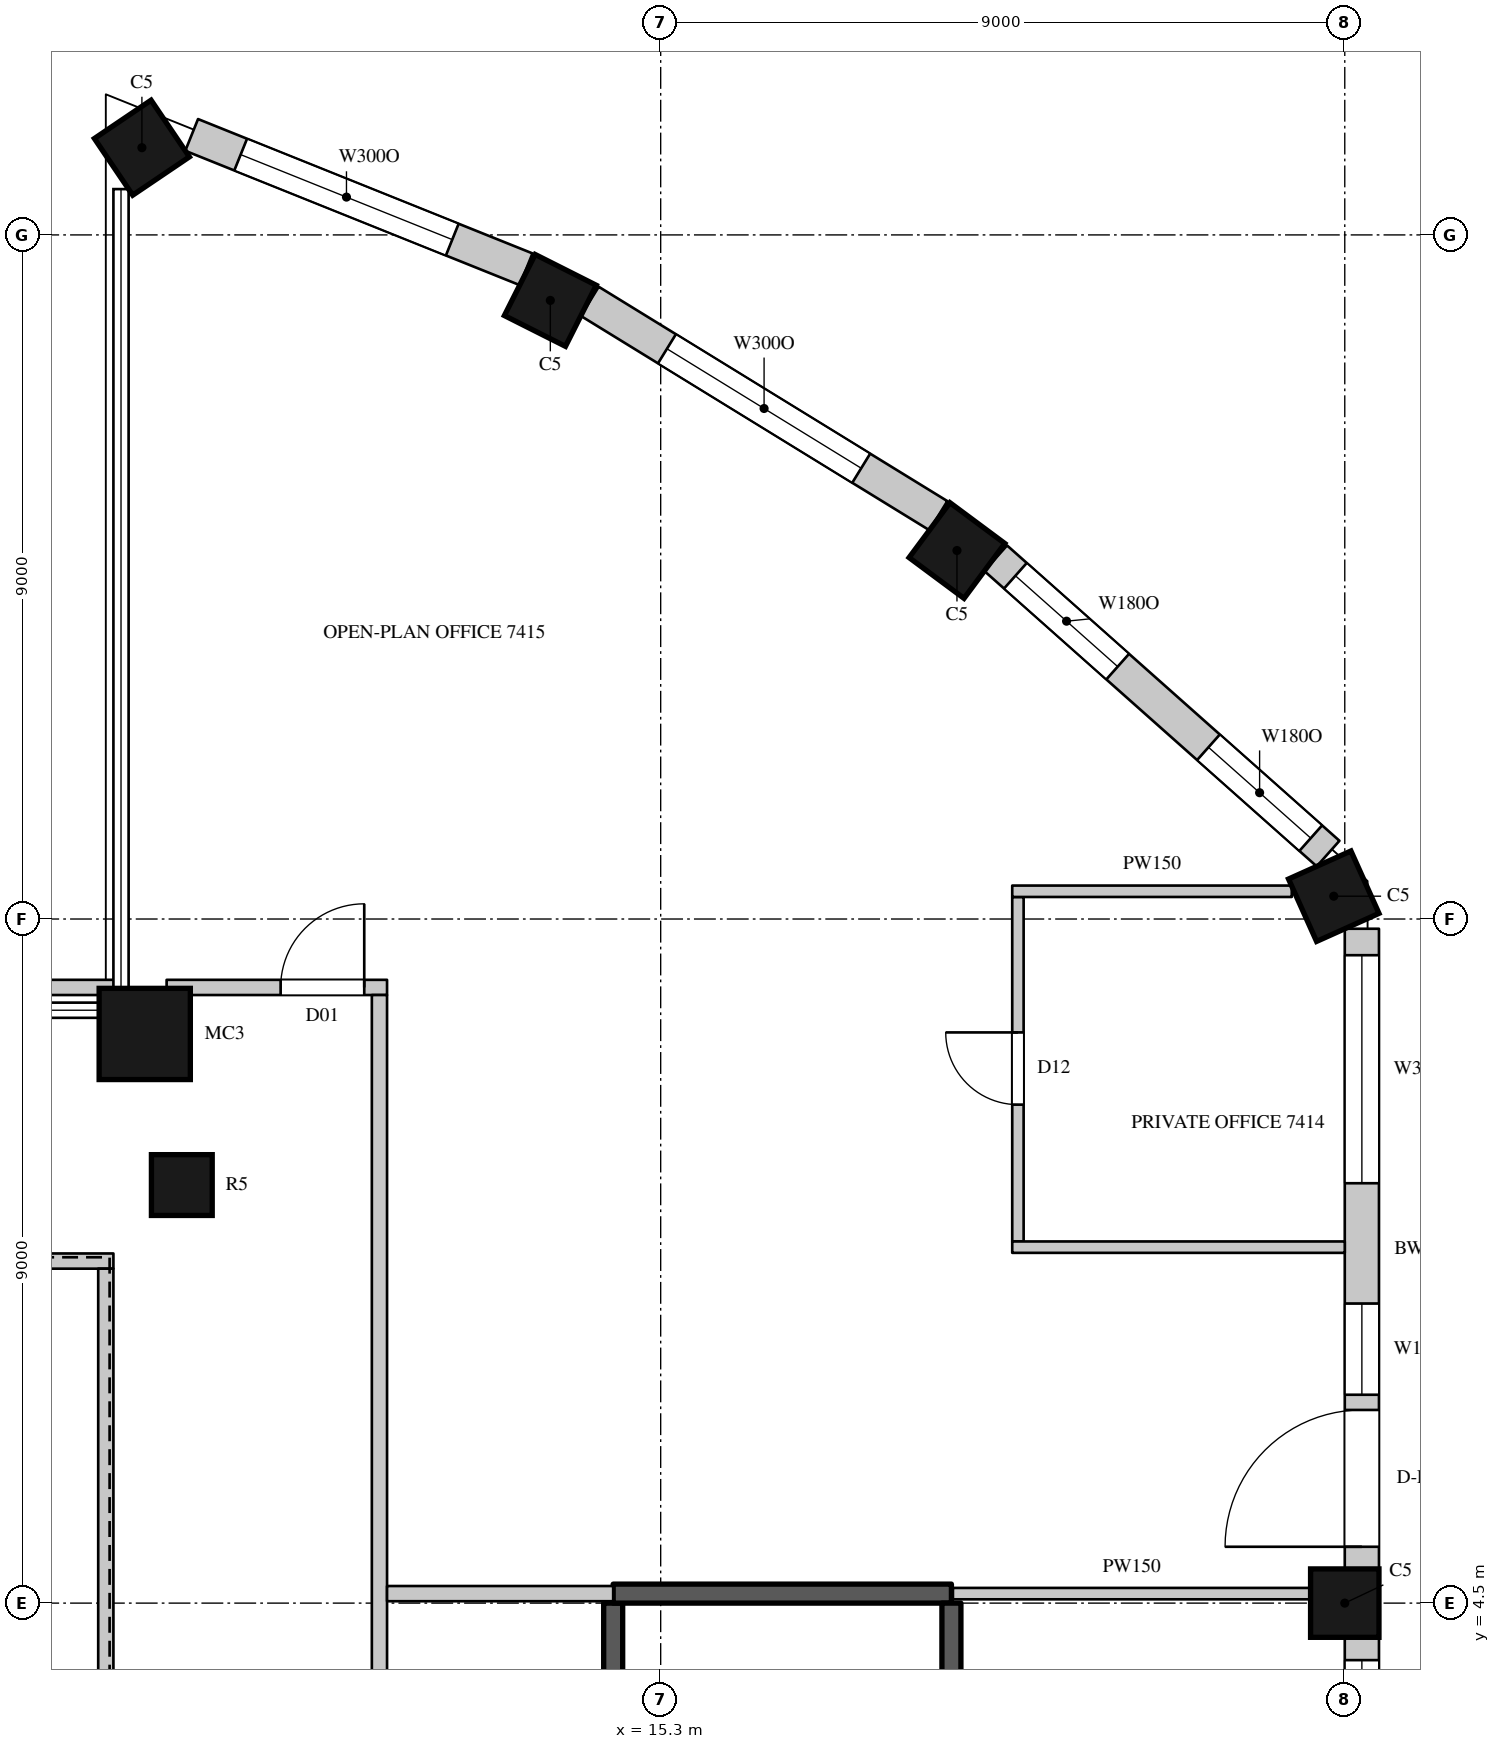
"""IFC4 building model, lengths in metres.
Left out: names, types, materials, properties, quantities, classifications, styles, units other than length and angle.
Written with IfcOpenShell. Run it as: python <this file> out.ifc"""

import sys

from ifc_helpers import new_model, si_unit, direction, frame, frame_2d, origin, origin_2d, place, context, subcontext, project, spatial, rectangle, circle, extrude, element, fill, save


model = new_model("IFC4")
c1 = context("Model", 3, precision=1e-05, world=origin(), true_north=direction((0.0, 1.0)))
c2 = subcontext(c1, "Body", "Model", "MODEL_VIEW")
j1 = project(units=[si_unit("LENGTHUNIT", "METRE"), si_unit("PLANEANGLEUNIT", "RADIAN")], contexts=[c1])
p1 = place(None, origin())
s1 = spatial("IfcSite", under=j1, at=p1, CompositionType="ELEMENT")
p2 = place(p1, origin())
s2 = spatial("IfcBuilding", under=s1, at=p2, CompositionType="ELEMENT")
p3 = place(p2, frame((0.0, 0.0, 325.4)))
s3 = spatial("IfcBuildingStorey", under=s2, at=p3, CompositionType="ELEMENT", Elevation=325.4)
p4 = place(p3, frame((8.475, 23.647, 0.0), z_axis=(0.0, 0.0, 1.0), x_axis=(-0.828469606019, -0.560034027451, 0.0)))
e1 = element("IfcColumn", 1, at=p4, inside=s3, PredefinedType="COLUMN", context=c2, shape_type="SweptSolid", body=[
    extrude(rectangle(XDim=0.9, YDim=0.9, at=origin_2d()), origin(), (0.0, 0.0, 1.0), 4.1),
])
p5 = place(p3, frame((8.512, 11.988, 0.0), z_axis=(0.0, 0.0, 1.0), x_axis=(1.0, 0.0, 0.0)))
e2 = element("IfcColumn", 2, at=p5, inside=s3, PredefinedType="COLUMN", context=c2, shape_type="SweptSolid", body=[
    extrude(circle(Radius=0.6, at=origin_2d()), origin(), (0.0, 0.0, 1.0), 4.1),
])
for number, where, z_axis, x_axis in (
    (3, (24.3, 4.5, 0.0), (0.0, 0.0, 1.0), (0.0, 1.0, 0.0)),
    (4, (24.155, 13.8, 0.0), (0.0, 0.0, 1.0), (-0.41, 0.912, 0.0)),
    (5, (19.198, 18.348, 0.0), (0.0, 0.0, 1.0), (-0.803, 0.596, 0.0)),
    (6, (13.848, 21.638, 0.0), (0.0, 0.0, 1.0), (-0.893, 0.45, 0.0)),
):
    element("IfcColumn", number, at=place(p3, frame(where, z_axis=z_axis, x_axis=x_axis)), inside=s3, PredefinedType="COLUMN", context=c2, shape_type="SweptSolid", body=[
        extrude(rectangle(XDim=0.9, YDim=0.9, at=origin_2d()), origin(), (0.0, 0.0, 1.0), 4.1),
    ])
p6 = place(p3, frame((9.0, 10.0, 0.0), z_axis=(0.0, 0.0, 1.0), x_axis=(1.0, 0.0, 0.0)))
e7 = element("IfcColumn", 7, at=p6, inside=s3, PredefinedType="COLUMN", context=c2, shape_type="SweptSolid", body=[
    extrude(circle(Radius=0.4, at=origin_2d()), origin(), (0.0, 0.0, 1.0), 4.1),
])
p7 = place(p3, frame((24.525, -4.05, 0.0), z_axis=(0.0, 0.0, 1.0), x_axis=(0.0, 1.0, 0.0)))
e8 = element("IfcWall", 8, at=p7, inside=s3, PredefinedType="SOLIDWALL", context=c2, shape_type="SweptSolid", body=[
    extrude(rectangle(XDim=8.1, YDim=0.45, at=frame_2d((4.05, 0.0))), origin(), (0.0, 0.0, 1.0), 3.8),
])
p8 = place(p7, frame((0.3, 0.0, 1.05)))
e9 = element("IfcOpeningElement", 9, at=p8, cuts=e8, PredefinedType="OPENING", context=c2, shape_type="SweptSolid", body=[
    extrude(rectangle(XDim=3.0, YDim=2.4, at=frame_2d((1.5, 1.2))), frame((0.0, 0.235, 0.0), z_axis=(0.0, -1.0, 0.0), x_axis=(1.0, 0.0, 0.0)), (0.0, 0.0, 1.0), 0.47),
])
p9 = place(p7, frame((4.8, 0.0, 1.05)))
e10 = element("IfcOpeningElement", 10, at=p9, cuts=e8, PredefinedType="OPENING", context=c2, shape_type="SweptSolid", body=[
    extrude(rectangle(XDim=3.0, YDim=2.4, at=frame_2d((1.5, 1.2))), frame((0.0, 0.235, 0.0), z_axis=(0.0, -1.0, 0.0), x_axis=(1.0, 0.0, 0.0)), (0.0, 0.0, 1.0), 0.47),
])
p10 = place(p3, frame((24.525, 4.95, 0.0), z_axis=(0.0, 0.0, 1.0), x_axis=(0.0, 1.0, 0.0)))
e11 = element("IfcWall", 11, at=p10, inside=s3, PredefinedType="SOLIDWALL", context=c2, shape_type="SweptSolid", body=[
    extrude(rectangle(XDim=8.422, YDim=0.45, at=frame_2d((4.211, 0.0))), origin(), (0.0, 0.0, 1.0), 3.8),
])
p11 = place(p10, frame((0.291, 0.0, 0.0)))
e12 = element("IfcOpeningElement", 12, at=p11, cuts=e11, PredefinedType="OPENING", context=c2, shape_type="SweptSolid", body=[
    extrude(rectangle(XDim=1.8, YDim=2.4, at=frame_2d((0.9, 1.2))), frame((0.0, 0.235, 0.0), z_axis=(0.0, -1.0, 0.0), x_axis=(1.0, 0.0, 0.0)), (0.0, 0.0, 1.0), 0.47),
])
p12 = place(p10, frame((2.291, 0.0, 1.05)))
e13 = element("IfcOpeningElement", 13, at=p12, cuts=e11, PredefinedType="OPENING", context=c2, shape_type="SweptSolid", body=[
    extrude(rectangle(XDim=1.2, YDim=2.4, at=frame_2d((0.6, 1.2))), frame((0.0, 0.235, 0.0), z_axis=(0.0, -1.0, 0.0), x_axis=(1.0, 0.0, 0.0)), (0.0, 0.0, 1.0), 0.47),
])
p13 = place(p10, frame((5.074, 0.0, 1.05)))
e14 = element("IfcOpeningElement", 14, at=p13, cuts=e11, PredefinedType="OPENING", context=c2, shape_type="SweptSolid", body=[
    extrude(rectangle(XDim=3.0, YDim=2.4, at=frame_2d((1.5, 1.2))), frame((0.0, 0.235, 0.0), z_axis=(0.0, -1.0, 0.0), x_axis=(1.0, 0.0, 0.0)), (0.0, 0.0, 1.0), 0.47),
])
p14 = place(p3, frame((24.081, 14.361, 0.0), z_axis=(0.0, 0.0, 1.0), x_axis=(-0.747570482973, 0.664182484704, 0.0)))
e15 = element("IfcWall", 15, at=p14, inside=s3, PredefinedType="SOLIDWALL", context=c2, shape_type="SweptSolid", body=[
    extrude(rectangle(XDim=5.85, YDim=0.45, at=frame_2d((2.925, 0.0))), origin(), (0.0, 0.0, 1.0), 3.8),
])
p15 = place(p14, frame((0.305, 0.0, 1.05)))
e16 = element("IfcOpeningElement", 16, at=p15, cuts=e15, PredefinedType="OPENING", context=c2, shape_type="SweptSolid", body=[
    extrude(rectangle(XDim=1.8, YDim=2.4, at=frame_2d((0.9, 1.2))), frame((0.0, 0.235, 0.0), z_axis=(0.0, -1.0, 0.0), x_axis=(1.0, 0.0, 0.0)), (0.0, 0.0, 1.0), 0.47),
])
p16 = place(p14, frame((3.703, 0.0, 1.05)))
e17 = element("IfcOpeningElement", 17, at=p16, cuts=e15, PredefinedType="OPENING", context=c2, shape_type="SweptSolid", body=[
    extrude(rectangle(XDim=1.8, YDim=2.4, at=frame_2d((0.9, 1.2))), frame((0.0, 0.235, 0.0), z_axis=(0.0, -1.0, 0.0), x_axis=(1.0, 0.0, 0.0)), (0.0, 0.0, 1.0), 0.47),
])
p17 = place(p3, frame((18.953, 18.806, 0.0), z_axis=(0.0, 0.0, 1.0), x_axis=(-0.851860664503, 0.523768468193, 0.0)))
e18 = element("IfcWall", 18, at=p17, inside=s3, PredefinedType="SOLIDWALL", context=c2, shape_type="SweptSolid", body=[
    extrude(rectangle(XDim=5.384, YDim=0.45, at=frame_2d((2.692, 0.0))), origin(), (0.0, 0.0, 1.0), 3.8),
])
p18 = place(p17, frame((1.192, 0.0, 1.05)))
e19 = element("IfcOpeningElement", 19, at=p18, cuts=e18, PredefinedType="OPENING", context=c2, shape_type="SweptSolid", body=[
    extrude(rectangle(XDim=3.0, YDim=2.4, at=frame_2d((1.5, 1.2))), frame((0.0, 0.235, 0.0), z_axis=(0.0, -1.0, 0.0), x_axis=(1.0, 0.0, 0.0)), (0.0, 0.0, 1.0), 0.47),
])
p19 = place(p3, frame((13.529, 22.048, 0.0), z_axis=(0.0, 0.0, 1.0), x_axis=(-0.927957332619, 0.372686448424, 0.0)))
e20 = element("IfcWall", 20, at=p19, inside=s3, PredefinedType="SOLIDWALL", context=c2, shape_type="SweptSolid", body=[
    extrude(rectangle(XDim=4.741, YDim=0.45, at=frame_2d((2.371, 0.0))), origin(), (0.0, 0.0, 1.0), 3.8),
])
p20 = place(p19, frame((1.047, 0.0, 1.05)))
e21 = element("IfcOpeningElement", 21, at=p20, cuts=e20, PredefinedType="OPENING", context=c2, shape_type="SweptSolid", body=[
    extrude(rectangle(XDim=3.0, YDim=2.4, at=frame_2d((1.5, 1.2))), frame((0.0, 0.235, 0.0), z_axis=(0.0, -1.0, 0.0), x_axis=(1.0, 0.0, 0.0)), (0.0, 0.0, 1.0), 0.47),
])
p21 = place(p3, frame((6.75, 12.6, 0.0), z_axis=(0.0, 0.0, 1.0), x_axis=(1.0, 0.0, 0.0)))
e22 = element("IfcWall", 22, at=p21, inside=s3, PredefinedType="PARTITIONING", context=c2, shape_type="SweptSolid", body=[
    extrude(rectangle(XDim=1.48, YDim=0.2, at=frame_2d((0.74, 0.0))), origin(), (0.0, 0.0, 1.0), 3.8),
])
p22 = place(p3, frame((-6.1, 9.0, 0.0), z_axis=(0.0, 0.0, 1.0), x_axis=(1.0, 0.0, 0.0)))
e23 = element("IfcWall", 23, at=p22, inside=s3, PredefinedType="PARTITIONING", context=c2, shape_type="SweptSolid", body=[
    extrude(rectangle(XDim=14.2, YDim=0.2, at=frame_2d((7.1, 0.0))), origin(), (0.0, 0.0, 1.0), 3.8),
])
p23 = place(p3, frame((8.0, 0.02, 0.0), z_axis=(0.0, 0.0, 1.0), x_axis=(0.0, 1.0, 0.0)))
e24 = element("IfcWall", 24, at=p23, inside=s3, PredefinedType="PARTITIONING", context=c2, shape_type="SweptSolid", body=[
    extrude(rectangle(XDim=8.88, YDim=0.2, at=frame_2d((4.44, 0.0))), origin(), (0.0, 0.0, 1.0), 3.8),
])
p24 = place(p3, frame((8.8, 12.6, 0.0), z_axis=(0.0, 0.0, 1.0), x_axis=(1.0, 0.0, 0.0)))
e25 = element("IfcWall", 25, at=p24, inside=s3, PredefinedType="PARTITIONING", context=c2, shape_type="SweptSolid", body=[
    extrude(rectangle(XDim=2.9, YDim=0.2, at=frame_2d((1.45, 0.0))), origin(), (0.0, 0.0, 1.0), 3.8),
])
p25 = place(p24, frame((1.5, 0.0, 0.0)))
e26 = element("IfcOpeningElement", 26, at=p25, cuts=e25, PredefinedType="OPENING", context=c2, shape_type="SweptSolid", body=[
    extrude(rectangle(XDim=1.1, YDim=2.4, at=frame_2d((0.55, 1.2))), frame((0.0, 0.11, 0.0), z_axis=(0.0, -1.0, 0.0), x_axis=(1.0, 0.0, 0.0)), (0.0, 0.0, 1.0), 0.22),
])
p26 = place(p3, frame((11.6, -12.5, 0.0), z_axis=(0.0, 0.0, 1.0), x_axis=(0.0, 1.0, 0.0)))
e27 = element("IfcWall", 27, at=p26, inside=s3, PredefinedType="PARTITIONING", context=c2, shape_type="SweptSolid", body=[
    extrude(rectangle(XDim=25.0, YDim=0.2, at=frame_2d((12.5, 0.0))), origin(), (0.0, 0.0, 1.0), 3.8),
])
p27 = place(p26, frame((9.4, 0.0, 0.0)))
e28 = element("IfcOpeningElement", 28, at=p27, cuts=e27, PredefinedType="OPENING", context=c2, shape_type="SweptSolid", body=[
    extrude(rectangle(XDim=1.5, YDim=2.4, at=frame_2d((0.75, 1.2))), frame((0.0, 0.11, 0.0), z_axis=(0.0, -1.0, 0.0), x_axis=(1.0, 0.0, 0.0)), (0.0, 0.0, 1.0), 0.22),
])
p28 = place(p26, frame((5.5, 0.0, 0.0)))
e29 = element("IfcOpeningElement", 29, at=p28, cuts=e27, PredefinedType="OPENING", context=c2, shape_type="SweptSolid", body=[
    extrude(rectangle(XDim=1.1, YDim=2.4, at=frame_2d((0.55, 1.2))), frame((0.0, 0.11, 0.0), z_axis=(0.0, -1.0, 0.0), x_axis=(1.0, 0.0, 0.0)), (0.0, 0.0, 1.0), 0.22),
])
p29 = place(p3, frame((11.7, 4.625, 0.0), z_axis=(0.0, 0.0, 1.0), x_axis=(1.0, 0.0, 0.0)))
e30 = element("IfcWall", 30, at=p29, inside=s3, PredefinedType="PARTITIONING", context=c2, shape_type="SweptSolid", body=[
    extrude(rectangle(XDim=2.975, YDim=0.2, at=frame_2d((1.488, 0.0))), origin(), (0.0, 0.0, 1.0), 3.8),
])
p30 = place(p3, frame((19.145, 4.625, 0.0), z_axis=(0.0, 0.0, 1.0), x_axis=(1.0, 0.0, 0.0)))
e31 = element("IfcWall", 31, at=p30, inside=s3, PredefinedType="PARTITIONING", context=c2, shape_type="SweptSolid", body=[
    extrude(rectangle(XDim=4.705, YDim=0.15, at=frame_2d((2.353, 0.0))), origin(), (0.0, 0.0, 1.0), 3.8),
])
p31 = place(p3, frame((20.0, 9.258, 0.0), z_axis=(0.0, 0.0, 1.0), x_axis=(0.0, 1.0, 0.0)))
e32 = element("IfcWall", 32, at=p31, inside=s3, PredefinedType="PARTITIONING", context=c2, shape_type="SweptSolid", body=[
    extrude(rectangle(XDim=4.532, YDim=0.15, at=frame_2d((2.266, 0.0))), origin(), (0.0, 0.0, 1.0), 3.8),
])
p32 = place(p31, frame((1.8, 0.0, 0.0)))
e33 = element("IfcOpeningElement", 33, at=p32, cuts=e32, PredefinedType="OPENING", context=c2, shape_type="SweptSolid", body=[
    extrude(rectangle(XDim=0.95, YDim=2.2, at=frame_2d((0.475, 1.1))), frame((0.0, 0.085, 0.0), z_axis=(0.0, -1.0, 0.0), x_axis=(1.0, 0.0, 0.0)), (0.0, 0.0, 1.0), 0.17),
])
p33 = place(p3, frame((19.925, 9.183, 0.0), z_axis=(0.0, 0.0, 1.0), x_axis=(1.0, 0.0, 0.0)))
e34 = element("IfcWall", 34, at=p33, inside=s3, PredefinedType="PARTITIONING", context=c2, shape_type="SweptSolid", body=[
    extrude(rectangle(XDim=4.375, YDim=0.15, at=frame_2d((2.188, 0.0))), origin(), (0.0, 0.0, 1.0), 3.8),
])
p34 = place(p3, frame((19.925, 13.865, 0.0), z_axis=(0.0, 0.0, 1.0), x_axis=(1.0, 0.0, 0.0)))
e35 = element("IfcWall", 35, at=p34, inside=s3, PredefinedType="PARTITIONING", context=c2, shape_type="SweptSolid", body=[
    extrude(rectangle(XDim=3.678, YDim=0.15, at=frame_2d((1.839, 0.0))), origin(), (0.0, 0.0, 1.0), 3.8),
])
p35 = place(p3, frame((14.675, -4.5, 0.0), z_axis=(0.0, 0.0, 1.0), x_axis=(0.0, 1.0, 0.0)))
e36 = element("IfcWall", 36, at=p35, inside=s3, PredefinedType="SHEAR", context=c2, shape_type="SweptSolid", body=[
    extrude(rectangle(XDim=9.0, YDim=0.25, at=frame_2d((4.5, 0.0))), origin(), (0.0, 0.0, 1.0), 3.8),
])
p36 = place(p35, frame((0.45, 0.0, 0.0)))
e37 = element("IfcOpeningElement", 37, at=p36, cuts=e36, PredefinedType="OPENING", context=c2, shape_type="SweptSolid", body=[
    extrude(rectangle(XDim=1.1, YDim=2.2, at=frame_2d((0.55, 1.1))), frame((0.0, 0.135, 0.0), z_axis=(0.0, -1.0, 0.0), x_axis=(1.0, 0.0, 0.0)), (0.0, 0.0, 1.0), 0.27),
])
p37 = place(p3, frame((14.675, 4.625, 0.0), z_axis=(0.0, 0.0, 1.0), x_axis=(1.0, 0.0, 0.0)))
e38 = element("IfcWall", 38, at=p37, inside=s3, PredefinedType="SHEAR", context=c2, shape_type="SweptSolid", body=[
    extrude(rectangle(XDim=4.45, YDim=0.25, at=frame_2d((2.225, 0.0))), origin(), (0.0, 0.0, 1.0), 3.8),
])
p38 = place(p3, frame((19.125, -4.5, 0.0), z_axis=(0.0, 0.0, 1.0), x_axis=(0.0, 1.0, 0.0)))
e39 = element("IfcWall", 39, at=p38, inside=s3, PredefinedType="SHEAR", context=c2, shape_type="SweptSolid", body=[
    extrude(rectangle(XDim=9.0, YDim=0.25, at=frame_2d((4.5, 0.0))), origin(), (0.0, 0.0, 1.0), 3.8),
])
p39 = place(p9, origin())
e40 = element("IfcWindow", 40, at=p39, inside=s3, PartitioningType="SINGLE_PANEL", PredefinedType="WINDOW", context=c2, shape_type="SweptSolid", body=[
    extrude(rectangle(XDim=3.0, YDim=2.4, at=frame_2d((1.5, 1.2))), frame((0.0, 0.135, 0.0), z_axis=(0.0, -1.0, 0.0), x_axis=(1.0, 0.0, 0.0)), (0.0, 0.0, 1.0), 0.06),
])
fill(e10, e40)
p40 = place(p11, origin())
e41 = element("IfcDoor", 41, at=p40, inside=s3, OperationType="SLIDING_TO_LEFT", PredefinedType="DOOR", context=c2, shape_type="SweptSolid", body=[
    extrude(rectangle(XDim=1.8, YDim=2.4, at=frame_2d((0.9, 1.2))), frame((0.0, 0.13, 0.0), z_axis=(0.0, -1.0, 0.0), x_axis=(1.0, 0.0, 0.0)), (0.0, 0.0, 1.0), 0.05),
])
fill(e12, e41)
p41 = place(p12, origin())
e42 = element("IfcWindow", 42, at=p41, inside=s3, PartitioningType="SINGLE_PANEL", PredefinedType="WINDOW", context=c2, shape_type="SweptSolid", body=[
    extrude(rectangle(XDim=1.2, YDim=2.4, at=frame_2d((0.6, 1.2))), frame((0.0, 0.135, 0.0), z_axis=(0.0, -1.0, 0.0), x_axis=(1.0, 0.0, 0.0)), (0.0, 0.0, 1.0), 0.06),
])
fill(e13, e42)
p42 = place(p13, origin())
e43 = element("IfcWindow", 43, at=p42, inside=s3, PartitioningType="SINGLE_PANEL", PredefinedType="WINDOW", context=c2, shape_type="SweptSolid", body=[
    extrude(rectangle(XDim=3.0, YDim=2.4, at=frame_2d((1.5, 1.2))), frame((0.0, 0.135, 0.0), z_axis=(0.0, -1.0, 0.0), x_axis=(1.0, 0.0, 0.0)), (0.0, 0.0, 1.0), 0.06),
])
fill(e14, e43)
p43 = place(p15, origin())
e44 = element("IfcWindow", 44, at=p43, inside=s3, PartitioningType="SINGLE_PANEL", PredefinedType="WINDOW", context=c2, shape_type="SweptSolid", body=[
    extrude(rectangle(XDim=1.8, YDim=2.4, at=frame_2d((0.9, 1.2))), frame((0.0, 0.135, 0.0), z_axis=(0.0, -1.0, 0.0), x_axis=(1.0, 0.0, 0.0)), (0.0, 0.0, 1.0), 0.06),
])
fill(e16, e44)
p44 = place(p16, origin())
e45 = element("IfcWindow", 45, at=p44, inside=s3, PartitioningType="SINGLE_PANEL", PredefinedType="WINDOW", context=c2, shape_type="SweptSolid", body=[
    extrude(rectangle(XDim=1.8, YDim=2.4, at=frame_2d((0.9, 1.2))), frame((0.0, 0.135, 0.0), z_axis=(0.0, -1.0, 0.0), x_axis=(1.0, 0.0, 0.0)), (0.0, 0.0, 1.0), 0.06),
])
fill(e17, e45)
p45 = place(p18, origin())
e46 = element("IfcWindow", 46, at=p45, inside=s3, PartitioningType="SINGLE_PANEL", PredefinedType="WINDOW", context=c2, shape_type="SweptSolid", body=[
    extrude(rectangle(XDim=3.0, YDim=2.4, at=frame_2d((1.5, 1.2))), frame((0.0, 0.135, 0.0), z_axis=(0.0, -1.0, 0.0), x_axis=(1.0, 0.0, 0.0)), (0.0, 0.0, 1.0), 0.06),
])
fill(e19, e46)
p46 = place(p20, origin())
e47 = element("IfcWindow", 47, at=p46, inside=s3, PartitioningType="SINGLE_PANEL", PredefinedType="WINDOW", context=c2, shape_type="SweptSolid", body=[
    extrude(rectangle(XDim=3.0, YDim=2.4, at=frame_2d((1.5, 1.2))), frame((0.0, 0.135, 0.0), z_axis=(0.0, -1.0, 0.0), x_axis=(1.0, 0.0, 0.0)), (0.0, 0.0, 1.0), 0.06),
])
fill(e21, e47)
p47 = place(p25, origin())
e48 = element("IfcDoor", 48, at=p47, inside=s3, OperationType="SINGLE_SWING_RIGHT", PredefinedType="DOOR", context=c2, shape_type="SweptSolid", body=[
    extrude(rectangle(XDim=1.1, YDim=2.4, at=frame_2d((0.55, 1.2))), frame((0.0, 0.025, 0.0), z_axis=(0.0, -1.0, 0.0), x_axis=(1.0, 0.0, 0.0)), (0.0, 0.0, 1.0), 0.05),
])
fill(e26, e48)
p48 = place(p32, origin())
e49 = element("IfcDoor", 49, at=p48, inside=s3, OperationType="SINGLE_SWING_RIGHT", PredefinedType="DOOR", context=c2, shape_type="SweptSolid", body=[
    extrude(rectangle(XDim=0.95, YDim=2.2, at=frame_2d((0.475, 1.1))), frame((0.0, 0.025, 0.0), z_axis=(0.0, -1.0, 0.0), x_axis=(1.0, 0.0, 0.0)), (0.0, 0.0, 1.0), 0.05),
])
fill(e33, e49)
save(model, sys.argv[1])
